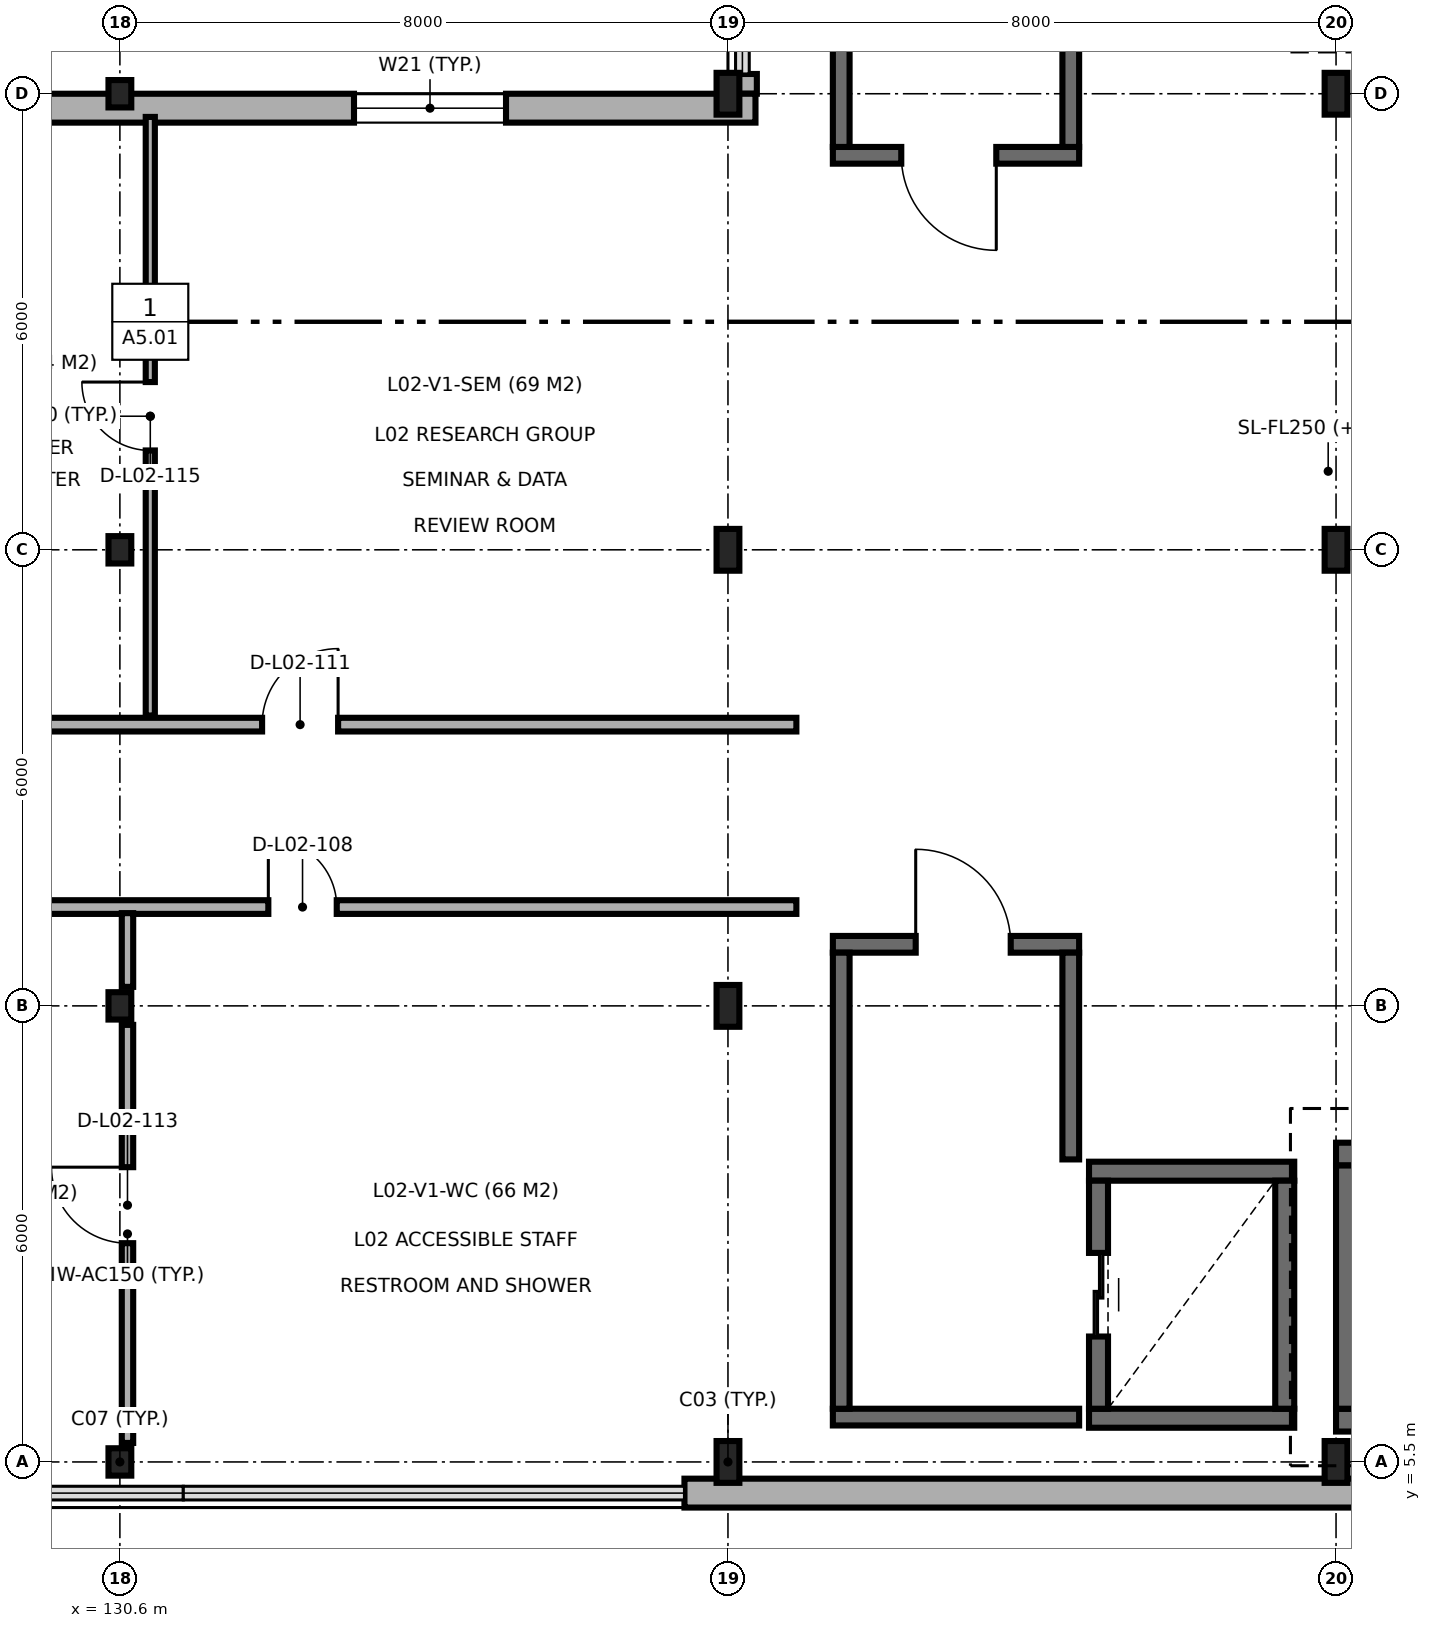
"""IFC4 building model, lengths in metres.
Left out: names, types, materials, properties, quantities, classifications, styles, units other than length and angle.
Written with IfcOpenShell. Run it as: python <this file> out.ifc"""

import sys

from ifc_helpers import new_model, si_unit, direction, frame, frame_2d, origin, origin_2d, place, context, subcontext, project, spatial, rectangle, i_section, extrude, element, fill, save


model = new_model("IFC4")
c1 = context("Model", 3, precision=1e-05, world=origin(), true_north=direction((0.0, 1.0)))
c2 = subcontext(c1, "Body", "Model", "MODEL_VIEW")
j1 = project(units=[si_unit("LENGTHUNIT", "METRE"), si_unit("PLANEANGLEUNIT", "RADIAN")], contexts=[c1])
p1 = place(None, origin())
s1 = spatial("IfcSite", under=j1, at=p1, CompositionType="ELEMENT")
p2 = place(p1, origin())
s2 = spatial("IfcBuilding", under=s1, at=p2, CompositionType="ELEMENT")
p3 = place(p2, frame((0.0, 0.0, 9.3)))
s3 = spatial("IfcBuildingStorey", under=s2, at=p3, CompositionType="ELEMENT", Elevation=9.3)
for number, where, z_axis, x_axis in (
    (1, (130.6, 5.5, 0.0), (0.0, 0.0, 1.0), (1.0, 0.0, 0.0)),
    (2, (130.6, 11.5, 0.0), (0.0, 0.0, 1.0), (1.0, 0.0, 0.0)),
    (3, (130.6, 17.5, 0.0), (0.0, 0.0, 1.0), (1.0, 0.0, 0.0)),
    (4, (130.6, 23.5, 0.0), (0.0, 0.0, 1.0), (1.0, 0.0, 0.0)),
):
    element("IfcColumn", number, at=place(p3, frame(where, z_axis=z_axis, x_axis=x_axis)), inside=s3, PredefinedType="COLUMN", context=c2, shape_type="SweptSolid", body=[
        extrude(i_section(OverallWidth=0.3, OverallDepth=0.36, WebThickness=0.012, FlangeThickness=0.022, FilletRadius=0.027, at=origin_2d()), origin(), (0.0, 0.0, 1.0), 4.5),
    ])
for number, where, z_axis, x_axis in (
    (5, (138.6, 5.5, 0.0), (0.0, 0.0, 1.0), (1.0, 0.0, 0.0)),
    (6, (138.6, 11.5, 0.0), (0.0, 0.0, 1.0), (1.0, 0.0, 0.0)),
    (7, (138.6, 17.5, 0.0), (0.0, 0.0, 1.0), (1.0, 0.0, 0.0)),
    (8, (138.6, 23.5, 0.0), (0.0, 0.0, 1.0), (1.0, 0.0, 0.0)),
    (9, (146.6, 5.5, 0.0), (0.0, 0.0, 1.0), (1.0, 0.0, 0.0)),
    (10, (146.6, 17.5, 0.0), (0.0, 0.0, 1.0), (1.0, 0.0, 0.0)),
    (11, (146.6, 23.5, 0.0), (0.0, 0.0, 1.0), (1.0, 0.0, 0.0)),
):
    element("IfcColumn", number, at=place(p3, frame(where, z_axis=z_axis, x_axis=x_axis)), inside=s3, PredefinedType="COLUMN", context=c2, shape_type="SweptSolid", body=[
        extrude(i_section(OverallWidth=0.3, OverallDepth=0.55, WebThickness=0.015, FlangeThickness=0.029, FilletRadius=0.027, at=origin_2d()), origin(), (0.0, 0.0, 1.0), 4.5),
    ])
for number, where, z_axis, x_axis in (
    (12, (146.6, 6.05, 0.0), (0.0, 0.0, 1.0), (1.0, 0.0, 0.0)),
    (13, (154.3, 9.55, 0.0), (0.0, 0.0, 1.0), (-1.0, 0.0, 0.0)),
):
    element("IfcWall", number, at=place(p3, frame(where, z_axis=z_axis, x_axis=x_axis)), inside=s3, PredefinedType="SHEAR", context=c2, shape_type="SweptSolid", body=[
        extrude(rectangle(XDim=7.7, YDim=0.3, at=frame_2d((3.85, 0.0))), origin(), (0.0, 0.0, 1.0), 4.5),
    ])
p4 = place(p3, frame((146.75, 9.4, 0.0), z_axis=(0.0, 0.0, 1.0), x_axis=(0.0, -1.0, 0.0)))
e14 = element("IfcWall", 14, at=p4, inside=s3, PredefinedType="SHEAR", context=c2, shape_type="SweptSolid", body=[
    extrude(rectangle(XDim=3.2, YDim=0.3, at=frame_2d((1.6, 0.0))), origin(), (0.0, 0.0, 1.0), 4.5),
])
for number, where, z_axis, x_axis in (
    (15, (143.35, 6.075, 0.0), (0.0, 0.0, 1.0), (1.0, 0.0, 0.0)),
    (16, (146.05, 9.325, 0.0), (0.0, 0.0, 1.0), (-1.0, 0.0, 0.0)),
):
    element("IfcWall", number, at=place(p3, frame(where, z_axis=z_axis, x_axis=x_axis)), inside=s3, PredefinedType="SHEAR", context=c2, shape_type="SweptSolid", body=[
        extrude(rectangle(XDim=2.7, YDim=0.25, at=frame_2d((1.35, 0.0))), origin(), (0.0, 0.0, 1.0), 4.5),
    ])
p5 = place(p3, frame((143.475, 9.2, 0.0), z_axis=(0.0, 0.0, 1.0), x_axis=(0.0, -1.0, 0.0)))
e17 = element("IfcWall", 17, at=p5, inside=s3, PredefinedType="SHEAR", context=c2, shape_type="SweptSolid", body=[
    extrude(rectangle(XDim=3.0, YDim=0.25, at=frame_2d((1.5, 0.0))), origin(), (0.0, 0.0, 1.0), 4.5),
])
p6 = place(p5, frame((0.95, 0.0, 0.0)))
e18 = element("IfcOpeningElement", 18, at=p6, cuts=e17, PredefinedType="OPENING", context=c2, shape_type="SweptSolid", body=[
    extrude(rectangle(XDim=1.1, YDim=2.15, at=frame_2d((0.55, 1.075))), frame((0.0, 0.135, 0.0), z_axis=(0.0, -1.0, 0.0), x_axis=(1.0, 0.0, 0.0)), (0.0, 0.0, 1.0), 0.27),
])
p7 = place(p3, frame((145.925, 6.2, 0.0), z_axis=(0.0, 0.0, 1.0), x_axis=(0.0, 1.0, 0.0)))
e19 = element("IfcWall", 19, at=p7, inside=s3, PredefinedType="SHEAR", context=c2, shape_type="SweptSolid", body=[
    extrude(rectangle(XDim=3.0, YDim=0.25, at=frame_2d((1.5, 0.0))), origin(), (0.0, 0.0, 1.0), 4.5),
])
p8 = place(p3, frame((139.98, 6.09, 0.0), z_axis=(0.0, 0.0, 1.0), x_axis=(1.0, 0.0, 0.0)))
e20 = element("IfcWall", 20, at=p8, inside=s3, PredefinedType="SOLIDWALL", context=c2, shape_type="SweptSolid", body=[
    extrude(rectangle(XDim=3.24, YDim=0.22, at=frame_2d((1.62, 0.0))), origin(), (0.0, 0.0, 1.0), 4.25),
])
p9 = place(p3, frame((143.22, 12.31, 0.0), z_axis=(0.0, 0.0, 1.0), x_axis=(-1.0, 0.0, 0.0)))
e21 = element("IfcWall", 21, at=p9, inside=s3, PredefinedType="SOLIDWALL", context=c2, shape_type="SweptSolid", body=[
    extrude(rectangle(XDim=3.24, YDim=0.22, at=frame_2d((1.62, 0.0))), origin(), (0.0, 0.0, 1.0), 4.25),
])
p10 = place(p9, frame((0.9, 0.0, 0.0)))
e22 = element("IfcOpeningElement", 22, at=p10, cuts=e21, PredefinedType="OPENING", context=c2, shape_type="SweptSolid", body=[
    extrude(rectangle(XDim=1.25, YDim=2.15, at=frame_2d((0.625, 1.075))), frame((0.0, 0.12, 0.0), z_axis=(0.0, -1.0, 0.0), x_axis=(1.0, 0.0, 0.0)), (0.0, 0.0, 1.0), 0.24),
])
p11 = place(p3, frame((140.09, 12.2, 0.0), z_axis=(0.0, 0.0, 1.0), x_axis=(0.0, -1.0, 0.0)))
e23 = element("IfcWall", 23, at=p11, inside=s3, PredefinedType="SOLIDWALL", context=c2, shape_type="SweptSolid", body=[
    extrude(rectangle(XDim=6.0, YDim=0.22, at=frame_2d((3.0, 0.0))), origin(), (0.0, 0.0, 1.0), 4.25),
])
p12 = place(p3, frame((143.11, 9.48, 0.0), z_axis=(0.0, 0.0, 1.0), x_axis=(0.0, 1.0, 0.0)))
e24 = element("IfcWall", 24, at=p12, inside=s3, PredefinedType="SOLIDWALL", context=c2, shape_type="SweptSolid", body=[
    extrude(rectangle(XDim=2.72, YDim=0.22, at=frame_2d((1.36, 0.0))), origin(), (0.0, 0.0, 1.0), 4.25),
])
p13 = place(p3, frame((139.98, 22.69, 0.0), z_axis=(0.0, 0.0, 1.0), x_axis=(1.0, 0.0, 0.0)))
e25 = element("IfcWall", 25, at=p13, inside=s3, PredefinedType="SOLIDWALL", context=c2, shape_type="SweptSolid", body=[
    extrude(rectangle(XDim=3.24, YDim=0.22, at=frame_2d((1.62, 0.0))), origin(), (0.0, 0.0, 1.0), 4.25),
])
p14 = place(p13, frame((0.9, 0.0, 0.0)))
e26 = element("IfcOpeningElement", 26, at=p14, cuts=e25, PredefinedType="OPENING", context=c2, shape_type="SweptSolid", body=[
    extrude(rectangle(XDim=1.25, YDim=2.15, at=frame_2d((0.625, 1.075))), frame((0.0, 0.12, 0.0), z_axis=(0.0, -1.0, 0.0), x_axis=(1.0, 0.0, 0.0)), (0.0, 0.0, 1.0), 0.24),
])
p15 = place(p3, frame((140.09, 28.8, 0.0), z_axis=(0.0, 0.0, 1.0), x_axis=(0.0, -1.0, 0.0)))
e27 = element("IfcWall", 27, at=p15, inside=s3, PredefinedType="SOLIDWALL", context=c2, shape_type="SweptSolid", body=[
    extrude(rectangle(XDim=6.0, YDim=0.22, at=frame_2d((3.0, 0.0))), origin(), (0.0, 0.0, 1.0), 4.25),
])
p16 = place(p3, frame((143.11, 22.8, 0.0), z_axis=(0.0, 0.0, 1.0), x_axis=(0.0, 1.0, 0.0)))
e28 = element("IfcWall", 28, at=p16, inside=s3, PredefinedType="SOLIDWALL", context=c2, shape_type="SweptSolid", body=[
    extrude(rectangle(XDim=1.72, YDim=0.22, at=frame_2d((0.86, 0.0))), origin(), (0.0, 0.0, 1.0), 4.25),
])
p17 = place(p3, frame((138.028, 5.09, 0.0), z_axis=(0.0, 0.0, 1.0), x_axis=(1.0, 0.0, 0.0)))
e29 = element("IfcWall", 29, at=p17, inside=s3, PredefinedType="SOLIDWALL", context=c2, shape_type="SweptSolid", body=[
    extrude(rectangle(XDim=13.186, YDim=0.38, at=frame_2d((6.593, 0.0))), origin(), (0.0, 0.0, 1.0), 4.25),
])
p18 = place(p17, frame((10.389, 0.0, 0.9)))
e30 = element("IfcOpeningElement", 30, at=p18, cuts=e29, PredefinedType="OPENING", context=c2, shape_type="SweptSolid", body=[
    extrude(rectangle(XDim=0.9, YDim=1.4, at=frame_2d((0.45, 0.7))), frame((0.0, 0.2, 0.0), z_axis=(0.0, -1.0, 0.0), x_axis=(1.0, 0.0, 0.0)), (0.0, 0.0, 1.0), 0.4),
])
p19 = place(p3, frame((138.79, 23.76, 0.0), z_axis=(0.0, 0.0, 1.0), x_axis=(0.0, -1.0, 0.0)))
e31 = element("IfcWall", 31, at=p19, inside=s3, PredefinedType="SOLIDWALL", context=c2, shape_type="SweptSolid", body=[
    extrude(rectangle(XDim=0.26, YDim=0.38, at=frame_2d((0.13, 0.0))), origin(), (0.0, 0.0, 1.0), 4.25),
])
p20 = place(p3, frame((138.962, 23.31, 0.0), z_axis=(0.0, 0.0, 1.0), x_axis=(-1.0, 0.0, 0.0)))
e32 = element("IfcWall", 32, at=p20, inside=s3, PredefinedType="SOLIDWALL", context=c2, shape_type="SweptSolid", body=[
    extrude(rectangle(XDim=33.9, YDim=0.38, at=frame_2d((16.95, 0.0))), origin(), (0.0, 0.0, 1.0), 4.25),
])
p21 = place(p20, frame((3.282, 0.0, 0.9)))
e33 = element("IfcOpeningElement", 33, at=p21, cuts=e32, PredefinedType="OPENING", context=c2, shape_type="SweptSolid", body=[
    extrude(rectangle(XDim=2.0, YDim=2.4, at=frame_2d((1.0, 1.2))), frame((0.0, 0.2, 0.0), z_axis=(0.0, -1.0, 0.0), x_axis=(1.0, 0.0, 0.0)), (0.0, 0.0, 1.0), 0.4),
])
p22 = place(p20, frame((10.762, 0.0, 0.9)))
e34 = element("IfcOpeningElement", 34, at=p22, cuts=e32, PredefinedType="OPENING", context=c2, shape_type="SweptSolid", body=[
    extrude(rectangle(XDim=3.2, YDim=2.4, at=frame_2d((1.6, 1.2))), frame((0.0, 0.2, 0.0), z_axis=(0.0, -1.0, 0.0), x_axis=(1.0, 0.0, 0.0)), (0.0, 0.0, 1.0), 0.4),
])
p23 = place(p20, frame((19.862, 0.0, 0.9)))
e35 = element("IfcOpeningElement", 35, at=p23, cuts=e32, PredefinedType="OPENING", context=c2, shape_type="SweptSolid", body=[
    extrude(rectangle(XDim=0.9, YDim=1.4, at=frame_2d((0.45, 0.7))), frame((0.0, 0.2, 0.0), z_axis=(0.0, -1.0, 0.0), x_axis=(1.0, 0.0, 0.0)), (0.0, 0.0, 1.0), 0.4),
])
p24 = place(p20, frame((22.842, 0.0, 0.9)))
e36 = element("IfcOpeningElement", 36, at=p24, cuts=e32, PredefinedType="OPENING", context=c2, shape_type="SweptSolid", body=[
    extrude(rectangle(XDim=0.9, YDim=1.8, at=frame_2d((0.45, 0.9))), frame((0.0, 0.2, 0.0), z_axis=(0.0, -1.0, 0.0), x_axis=(1.0, 0.0, 0.0)), (0.0, 0.0, 1.0), 0.4),
])
p25 = place(p20, frame((27.387, 0.0, 0.9)))
e37 = element("IfcOpeningElement", 37, at=p25, cuts=e32, PredefinedType="OPENING", context=c2, shape_type="SweptSolid", body=[
    extrude(rectangle(XDim=1.95, YDim=1.95, at=frame_2d((0.975, 0.975))), frame((0.0, 0.2, 0.0), z_axis=(0.0, -1.0, 0.0), x_axis=(1.0, 0.0, 0.0)), (0.0, 0.0, 1.0), 0.4),
])
p26 = place(p3, frame((105.005, 12.8, 0.0), z_axis=(0.0, 0.0, 1.0), x_axis=(1.0, 0.0, 0.0)))
e38 = element("IfcWall", 38, at=p26, inside=s3, PredefinedType="PARTITIONING", context=c2, shape_type="SweptSolid", body=[
    extrude(rectangle(XDim=34.495, YDim=0.18, at=frame_2d((17.248, 0.0))), origin(), (0.0, 0.0, 1.0), 4.25),
])
p27 = place(p26, frame((6.011, 0.0, 0.0)))
e39 = element("IfcOpeningElement", 39, at=p27, cuts=e38, PredefinedType="OPENING", context=c2, shape_type="SweptSolid", body=[
    extrude(rectangle(XDim=1.1, YDim=2.15, at=frame_2d((0.55, 1.075))), frame((0.0, 0.1, 0.0), z_axis=(0.0, -1.0, 0.0), x_axis=(1.0, 0.0, 0.0)), (0.0, 0.0, 1.0), 0.2),
])
p28 = place(p26, frame((11.548, 0.0, 0.0)))
e40 = element("IfcOpeningElement", 40, at=p28, cuts=e38, PredefinedType="OPENING", context=c2, shape_type="SweptSolid", body=[
    extrude(rectangle(XDim=1.5, YDim=2.2, at=frame_2d((0.75, 1.1))), frame((0.0, 0.1, 0.0), z_axis=(0.0, -1.0, 0.0), x_axis=(1.0, 0.0, 0.0)), (0.0, 0.0, 1.0), 0.2),
])
p29 = place(p26, frame((27.548, 0.0, 0.0)))
e41 = element("IfcOpeningElement", 41, at=p29, cuts=e38, PredefinedType="OPENING", context=c2, shape_type="SweptSolid", body=[
    extrude(rectangle(XDim=0.9, YDim=2.1, at=frame_2d((0.45, 1.05))), frame((0.0, 0.1, 0.0), z_axis=(0.0, -1.0, 0.0), x_axis=(1.0, 0.0, 0.0)), (0.0, 0.0, 1.0), 0.2),
])
p30 = place(p3, frame((105.005, 15.2, 0.0), z_axis=(0.0, 0.0, 1.0), x_axis=(1.0, 0.0, 0.0)))
e42 = element("IfcWall", 42, at=p30, inside=s3, PredefinedType="PARTITIONING", context=c2, shape_type="SweptSolid", body=[
    extrude(rectangle(XDim=34.495, YDim=0.18, at=frame_2d((17.248, 0.0))), origin(), (0.0, 0.0, 1.0), 4.25),
])
p31 = place(p30, frame((7.391, 0.0, 0.0)))
e43 = element("IfcOpeningElement", 43, at=p31, cuts=e42, PredefinedType="OPENING", context=c2, shape_type="SweptSolid", body=[
    extrude(rectangle(XDim=0.9, YDim=2.1, at=frame_2d((0.45, 1.05))), frame((0.0, 0.1, 0.0), z_axis=(0.0, -1.0, 0.0), x_axis=(1.0, 0.0, 0.0)), (0.0, 0.0, 1.0), 0.2),
])
p32 = place(p30, frame((18.45, 0.0, 0.0)))
e44 = element("IfcOpeningElement", 44, at=p32, cuts=e42, PredefinedType="OPENING", context=c2, shape_type="SweptSolid", body=[
    extrude(rectangle(XDim=0.95, YDim=2.1, at=frame_2d((0.475, 1.05))), frame((0.0, 0.1, 0.0), z_axis=(0.0, -1.0, 0.0), x_axis=(1.0, 0.0, 0.0)), (0.0, 0.0, 1.0), 0.2),
])
p33 = place(p30, frame((27.466, 0.0, 0.0)))
e45 = element("IfcOpeningElement", 45, at=p33, cuts=e42, PredefinedType="OPENING", context=c2, shape_type="SweptSolid", body=[
    extrude(rectangle(XDim=1.0, YDim=2.15, at=frame_2d((0.5, 1.075))), frame((0.0, 0.1, 0.0), z_axis=(0.0, -1.0, 0.0), x_axis=(1.0, 0.0, 0.0)), (0.0, 0.0, 1.0), 0.2),
])
p34 = place(p3, frame((130.7, 5.75, 0.0), z_axis=(0.0, 0.0, 1.0), x_axis=(0.0, 1.0, 0.0)))
e46 = element("IfcWall", 46, at=p34, inside=s3, PredefinedType="PARTITIONING", context=c2, shape_type="SweptSolid", body=[
    extrude(rectangle(XDim=5.5, YDim=0.15, at=frame_2d((2.75, 0.0))), origin(), (0.0, 0.0, 1.0), 3.9),
])
p35 = place(p34, frame((2.628, 0.0, 0.0)))
e47 = element("IfcOpeningElement", 47, at=p35, cuts=e46, PredefinedType="OPENING", context=c2, shape_type="SweptSolid", body=[
    extrude(rectangle(XDim=1.0, YDim=2.15, at=frame_2d((0.5, 1.075))), frame((0.0, 0.085, 0.0), z_axis=(0.0, -1.0, 0.0), x_axis=(1.0, 0.0, 0.0)), (0.0, 0.0, 1.0), 0.17),
])
p36 = place(p3, frame((130.7, 11.75, 0.0), z_axis=(0.0, 0.0, 1.0), x_axis=(0.0, 1.0, 0.0)))
e48 = element("IfcWall", 48, at=p36, inside=s3, PredefinedType="PARTITIONING", context=c2, shape_type="SweptSolid", body=[
    extrude(rectangle(XDim=0.97, YDim=0.15, at=frame_2d((0.485, 0.0))), origin(), (0.0, 0.0, 1.0), 3.9),
])
p37 = place(p3, frame((131.0, 15.32, 0.0), z_axis=(0.0, 0.0, 1.0), x_axis=(0.0, 1.0, 0.0)))
e49 = element("IfcWall", 49, at=p37, inside=s3, PredefinedType="PARTITIONING", context=c2, shape_type="SweptSolid", body=[
    extrude(rectangle(XDim=7.875, YDim=0.12, at=frame_2d((3.938, 0.0))), origin(), (0.0, 0.0, 1.0), 4.25),
])
p38 = place(p37, frame((3.487, 0.0, 0.0)))
e50 = element("IfcOpeningElement", 50, at=p38, cuts=e49, PredefinedType="OPENING", context=c2, shape_type="SweptSolid", body=[
    extrude(rectangle(XDim=0.9, YDim=2.1, at=frame_2d((0.45, 1.05))), frame((0.0, 0.07, 0.0), z_axis=(0.0, -1.0, 0.0), x_axis=(1.0, 0.0, 0.0)), (0.0, 0.0, 1.0), 0.14),
])
p39 = place(p6, origin())
e51 = element("IfcDoor", 51, at=p39, inside=s3, OperationType="DOUBLE_DOOR_SLIDING", PredefinedType="DOOR", context=c2, shape_type="SweptSolid", body=[
    extrude(rectangle(XDim=1.1, YDim=2.15, at=frame_2d((0.55, 1.075))), frame((0.0, 0.025, 0.0), z_axis=(0.0, -1.0, 0.0), x_axis=(1.0, 0.0, 0.0)), (0.0, 0.0, 1.0), 0.05),
])
fill(e18, e51)
p40 = place(p10, frame((1.25, 0.0, 0.0), z_axis=(0.0, 0.0, 1.0), x_axis=(-1.0, 0.0, 0.0)))
e52 = element("IfcDoor", 52, at=p40, inside=s3, OperationType="SINGLE_SWING_RIGHT", PredefinedType="DOOR", context=c2, shape_type="SweptSolid", body=[
    extrude(rectangle(XDim=1.25, YDim=2.15, at=frame_2d((0.625, 1.075))), frame((0.0, 0.025, 0.0), z_axis=(0.0, -1.0, 0.0), x_axis=(1.0, 0.0, 0.0)), (0.0, 0.0, 1.0), 0.05),
])
fill(e22, e52)
p41 = place(p14, frame((1.25, 0.0, 0.0), z_axis=(0.0, 0.0, 1.0), x_axis=(-1.0, 0.0, 0.0)))
e53 = element("IfcDoor", 53, at=p41, inside=s3, OperationType="SINGLE_SWING_RIGHT", PredefinedType="DOOR", context=c2, shape_type="SweptSolid", body=[
    extrude(rectangle(XDim=1.25, YDim=2.15, at=frame_2d((0.625, 1.075))), frame((0.0, 0.025, 0.0), z_axis=(0.0, -1.0, 0.0), x_axis=(1.0, 0.0, 0.0)), (0.0, 0.0, 1.0), 0.05),
])
fill(e26, e53)
p42 = place(p21, origin())
e54 = element("IfcWindow", 54, at=p42, inside=s3, PartitioningType="SINGLE_PANEL", PredefinedType="WINDOW", context=c2, shape_type="SweptSolid", body=[
    extrude(rectangle(XDim=2.0, YDim=2.4, at=frame_2d((1.0, 1.2))), frame((0.0, 0.03, 0.0), z_axis=(0.0, -1.0, 0.0), x_axis=(1.0, 0.0, 0.0)), (0.0, 0.0, 1.0), 0.06),
])
fill(e33, e54)
p43 = place(p29, origin())
e55 = element("IfcDoor", 55, at=p43, inside=s3, OperationType="SINGLE_SWING_LEFT", PredefinedType="DOOR", context=c2, shape_type="SweptSolid", body=[
    extrude(rectangle(XDim=0.9, YDim=2.1, at=frame_2d((0.45, 1.05))), frame((0.0, 0.025, 0.0), z_axis=(0.0, -1.0, 0.0), x_axis=(1.0, 0.0, 0.0)), (0.0, 0.0, 1.0), 0.05),
])
fill(e41, e55)
p44 = place(p33, origin())
e56 = element("IfcDoor", 56, at=p44, inside=s3, OperationType="SINGLE_SWING_RIGHT", PredefinedType="DOOR", context=c2, shape_type="SweptSolid", body=[
    extrude(rectangle(XDim=1.0, YDim=2.15, at=frame_2d((0.5, 1.075))), frame((0.0, 0.025, 0.0), z_axis=(0.0, -1.0, 0.0), x_axis=(1.0, 0.0, 0.0)), (0.0, 0.0, 1.0), 0.05),
])
fill(e45, e56)
p45 = place(p35, origin())
e57 = element("IfcDoor", 57, at=p45, inside=s3, OperationType="SINGLE_SWING_RIGHT", PredefinedType="DOOR", context=c2, shape_type="SweptSolid", body=[
    extrude(rectangle(XDim=1.0, YDim=2.15, at=frame_2d((0.5, 1.075))), frame((0.0, 0.025, 0.0), z_axis=(0.0, -1.0, 0.0), x_axis=(1.0, 0.0, 0.0)), (0.0, 0.0, 1.0), 0.05),
])
fill(e47, e57)
p46 = place(p38, origin())
e58 = element("IfcDoor", 58, at=p46, inside=s3, OperationType="SINGLE_SWING_RIGHT", PredefinedType="DOOR", context=c2, shape_type="SweptSolid", body=[
    extrude(rectangle(XDim=0.9, YDim=2.1, at=frame_2d((0.45, 1.05))), frame((0.0, 0.025, 0.0), z_axis=(0.0, -1.0, 0.0), x_axis=(1.0, 0.0, 0.0)), (0.0, 0.0, 1.0), 0.05),
])
fill(e50, e58)
save(model, sys.argv[1])
